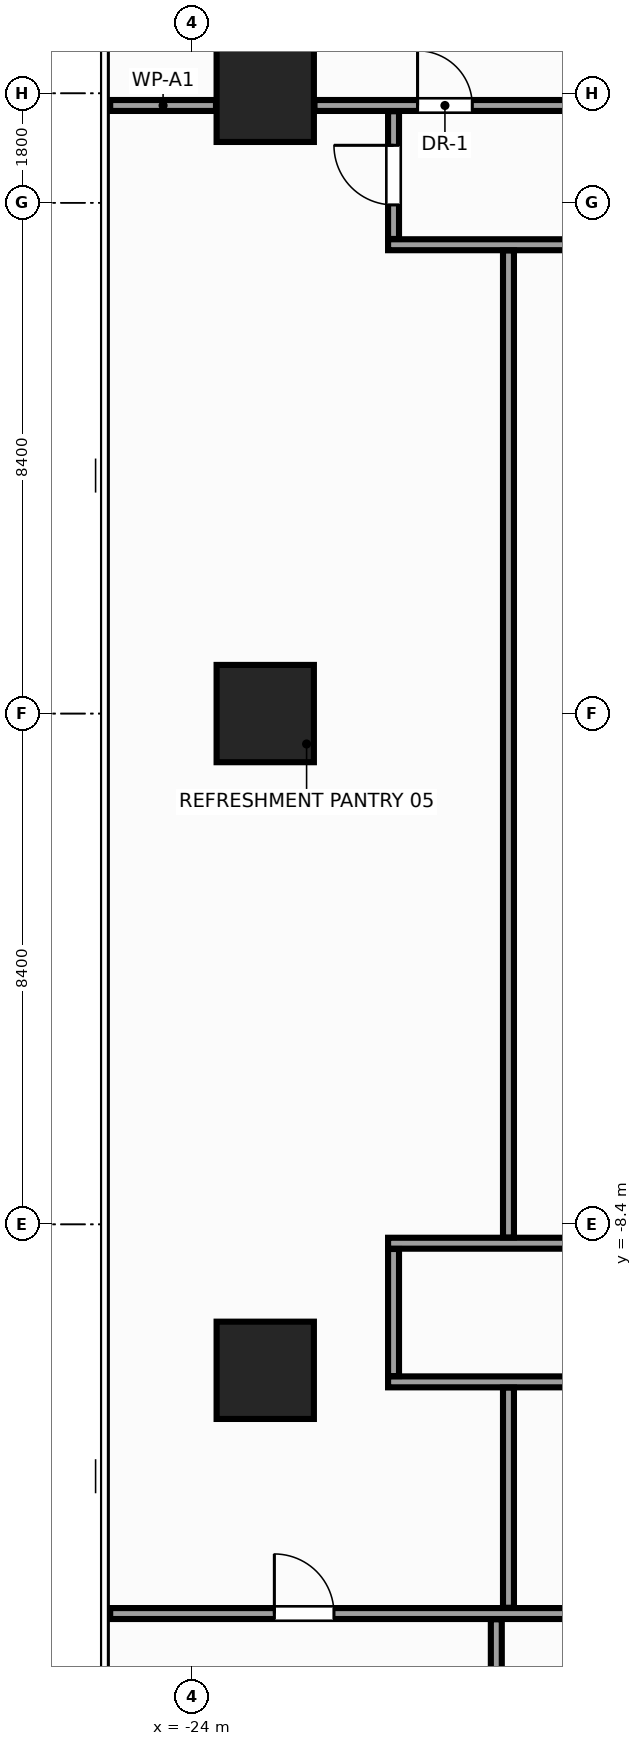
"""IFC4 building model, lengths in metres.
Left out: names, types, materials, properties, quantities, classifications, styles, units other than length and angle.
Written with IfcOpenShell. Run it as: python <this file> out.ifc"""

import sys

from ifc_helpers import new_model, si_unit, direction, frame, frame_2d, origin, origin_2d, place, context, subcontext, project, spatial, rectangle, extrude, source, transform, mapped, element, fill, save


model = new_model("IFC4")
c1 = context("Model", 3, precision=1e-05, world=origin(), true_north=direction((0.0, 1.0)))
c2 = subcontext(c1, "Body", "Model", "MODEL_VIEW")
j1 = project(units=[si_unit("LENGTHUNIT", "METRE"), si_unit("PLANEANGLEUNIT", "RADIAN")], contexts=[c1])
p1 = place(None, origin())
s1 = spatial("IfcSite", under=j1, at=p1, CompositionType="ELEMENT")
p2 = place(p1, origin())
s2 = spatial("IfcBuilding", under=s1, at=p2, CompositionType="ELEMENT")
p3 = place(p2, frame((0.0, 0.0, 117.2)))
s3 = spatial("IfcBuildingStorey", under=s2, at=p3, CompositionType="ELEMENT", Elevation=117.2)
m1 = source(origin(), c2, "Body", "SweptSolid", [
    extrude(rectangle(XDim=1.6, YDim=1.6, at=origin_2d()), origin(), (0.0, 0.0, 1.0), 3.6),
])
for number, where, z_axis, x_axis in (
    (1, (-22.8, -10.8, 0.0), (0.0, 0.0, 1.0), (1.0, 0.0, 0.0)),
    (2, (-22.8, 0.0, 0.0), (0.0, 0.0, 1.0), (1.0, 0.0, 0.0)),
    (3, (-22.8, 10.2, 0.0), (0.0, 0.0, 1.0), (1.0, 0.0, 0.0)),
):
    element("IfcColumn", number, at=place(p3, frame(where, z_axis=z_axis, x_axis=x_axis)), inside=s3, PredefinedType="COLUMN", context=c2, shape_type="MappedRepresentation", body=[
        mapped(m1, transform((0.0, 0.0, 0.0), x_axis=(1.0, 0.0, 0.0), y_axis=(0.0, 1.0, 0.0), z_axis=(0.0, 0.0, 1.0), scale=1.0)),
    ])
m2 = source(origin(), c2, "Body", "SweptSolid", [
    extrude(rectangle(XDim=1.74, YDim=0.18, at=frame_2d((0.87, 0.0))), origin(), (0.0, 0.0, 1.0), 3.36),
])
p4 = place(p3, frame((-25.35, 10.0, 0.0), z_axis=(0.0, 0.0, 1.0), x_axis=(1.0, 0.0, 0.0)))
e4 = element("IfcWall", 4, at=p4, inside=s3, PredefinedType="PARTITIONING", context=c2, shape_type="MappedRepresentation", body=[
    mapped(m2, transform((0.0, 0.0, 0.0), x_axis=(1.0, 0.0, 0.0), y_axis=(0.0, 1.0, 0.0), z_axis=(0.0, 0.0, 1.0), scale=1.0)),
])
m3 = source(origin(), c2, "Body", "SweptSolid", [
    extrude(rectangle(XDim=4.38, YDim=0.18, at=frame_2d((2.19, 0.0))), origin(), (0.0, 0.0, 1.0), 2.745),
])
p5 = place(p3, frame((-21.99, 10.0, 0.0), z_axis=(0.0, 0.0, 1.0), x_axis=(1.0, 0.0, 0.0)))
e5 = element("IfcWall", 5, at=p5, inside=s3, PredefinedType="PARTITIONING", context=c2, shape_type="MappedRepresentation", body=[
    mapped(m3, transform((0.0, 0.0, 0.0), x_axis=(1.0, 0.0, 0.0), y_axis=(0.0, 1.0, 0.0), z_axis=(0.0, 0.0, 1.0), scale=1.0)),
])
p6 = place(p5, frame((1.695, 0.0, 0.0)))
e6 = element("IfcOpeningElement", 6, at=p6, cuts=e5, PredefinedType="OPENING", context=c2, shape_type="SweptSolid", body=[
    extrude(rectangle(XDim=0.9, YDim=2.15, at=frame_2d((0.45, 1.075))), frame((0.0, 0.102, 0.0), z_axis=(0.0, -1.0, 0.0), x_axis=(1.0, 0.0, 0.0)), (0.0, 0.0, 1.0), 0.204),
])
m4 = source(origin(), c2, "Body", "SweptSolid", [
    extrude(rectangle(XDim=16.8, YDim=0.18, at=frame_2d((8.4, 0.0))), origin(), (0.0, 0.0, 1.0), 2.745),
])
p7 = place(p3, frame((-20.78, 7.71, 0.0), z_axis=(0.0, 0.0, 1.0), x_axis=(1.0, 0.0, 0.0)))
e7 = element("IfcWall", 7, at=p7, inside=s3, PredefinedType="PARTITIONING", context=c2, shape_type="MappedRepresentation", body=[
    mapped(m4, transform((0.0, 0.0, 0.0), x_axis=(1.0, 0.0, 0.0), y_axis=(0.0, 1.0, 0.0), z_axis=(0.0, 0.0, 1.0), scale=1.0)),
])
p8 = place(p7, frame((5.69, 0.0, 0.0)))
e8 = element("IfcOpeningElement", 8, at=p8, cuts=e7, PredefinedType="OPENING", context=c2, shape_type="SweptSolid", body=[
    extrude(rectangle(XDim=0.98, YDim=2.15, at=frame_2d((0.49, 1.075))), frame((0.0, 0.102, 0.0), z_axis=(0.0, -1.0, 0.0), x_axis=(1.0, 0.0, 0.0)), (0.0, 0.0, 1.0), 0.204),
])
p9 = place(p7, frame((13.085, 0.0, 0.0)))
e9 = element("IfcOpeningElement", 9, at=p9, cuts=e7, PredefinedType="OPENING", context=c2, shape_type="SweptSolid", body=[
    extrude(rectangle(XDim=0.98, YDim=2.15, at=frame_2d((0.49, 1.075))), frame((0.0, 0.102, 0.0), z_axis=(0.0, -1.0, 0.0), x_axis=(1.0, 0.0, 0.0)), (0.0, 0.0, 1.0), 0.204),
])
p10 = place(p3, frame((-20.78, -8.71, 0.0), z_axis=(0.0, 0.0, 1.0), x_axis=(1.0, 0.0, 0.0)))
e10 = element("IfcWall", 10, at=p10, inside=s3, PredefinedType="PARTITIONING", context=c2, shape_type="MappedRepresentation", body=[
    mapped(m4, transform((0.0, 0.0, 0.0), x_axis=(1.0, 0.0, 0.0), y_axis=(0.0, 1.0, 0.0), z_axis=(0.0, 0.0, 1.0), scale=1.0)),
])
m5 = source(origin(), c2, "Body", "SweptSolid", [
    extrude(rectangle(XDim=3.17, YDim=0.18, at=frame_2d((1.585, 0.0))), origin(), (0.0, 0.0, 1.0), 2.745),
])
p11 = place(p3, frame((-20.78, -10.99, 0.0), z_axis=(0.0, 0.0, 1.0), x_axis=(1.0, 0.0, 0.0)))
e11 = element("IfcWall", 11, at=p11, inside=s3, PredefinedType="PARTITIONING", context=c2, shape_type="MappedRepresentation", body=[
    mapped(m5, transform((0.0, 0.0, 0.0), x_axis=(1.0, 0.0, 0.0), y_axis=(0.0, 1.0, 0.0), z_axis=(0.0, 0.0, 1.0), scale=1.0)),
])
m6 = source(origin(), c2, "Body", "SweptSolid", [
    extrude(rectangle(XDim=2.1, YDim=0.18, at=frame_2d((1.05, 0.0))), origin(), (0.0, 0.0, 1.0), 3.36),
])
p12 = place(p3, frame((-20.69, 7.805, 0.0), z_axis=(0.0, 0.0, 1.0), x_axis=(0.0, 1.0, 0.0)))
e12 = element("IfcWall", 12, at=p12, inside=s3, PredefinedType="PARTITIONING", context=c2, shape_type="MappedRepresentation", body=[
    mapped(m6, transform((0.0, 0.0, 0.0), x_axis=(1.0, 0.0, 0.0), y_axis=(0.0, 1.0, 0.0), z_axis=(0.0, 0.0, 1.0), scale=1.0)),
])
p13 = place(p12, frame((0.56, 0.0, 0.0)))
e13 = element("IfcOpeningElement", 13, at=p13, cuts=e12, PredefinedType="OPENING", context=c2, shape_type="SweptSolid", body=[
    extrude(rectangle(XDim=0.98, YDim=2.15, at=frame_2d((0.49, 1.075))), frame((0.0, 0.102, 0.0), z_axis=(0.0, -1.0, 0.0), x_axis=(1.0, 0.0, 0.0)), (0.0, 0.0, 1.0), 0.204),
])
m7 = source(origin(), c2, "Body", "SweptSolid", [
    extrude(rectangle(XDim=2.09, YDim=0.18, at=frame_2d((1.045, 0.0))), origin(), (0.0, 0.0, 1.0), 3.36),
])
p14 = place(p3, frame((-20.69, -10.895, 0.0), z_axis=(0.0, 0.0, 1.0), x_axis=(0.0, 1.0, 0.0)))
e14 = element("IfcWall", 14, at=p14, inside=s3, PredefinedType="PARTITIONING", context=c2, shape_type="MappedRepresentation", body=[
    mapped(m7, transform((0.0, 0.0, 0.0), x_axis=(1.0, 0.0, 0.0), y_axis=(0.0, 1.0, 0.0), z_axis=(0.0, 0.0, 1.0), scale=1.0)),
])
m8 = source(origin(), c2, "Body", "SweptSolid", [
    extrude(rectangle(XDim=50.7, YDim=0.18, at=frame_2d((25.35, 0.0))), origin(), (0.0, 0.0, 1.0), 2.945),
])
p15 = place(p3, frame((-25.35, -14.8, 0.0), z_axis=(0.0, 0.0, 1.0), x_axis=(1.0, 0.0, 0.0)))
e15 = element("IfcWall", 15, at=p15, inside=s3, PredefinedType="PARTITIONING", context=c2, shape_type="MappedRepresentation", body=[
    mapped(m8, transform((0.0, 0.0, 0.0), x_axis=(1.0, 0.0, 0.0), y_axis=(0.0, 1.0, 0.0), z_axis=(0.0, 0.0, 1.0), scale=1.0)),
])
p16 = place(p15, frame((2.7, 0.0, 0.0)))
e16 = element("IfcOpeningElement", 16, at=p16, cuts=e15, PredefinedType="OPENING", context=c2, shape_type="SweptSolid", body=[
    extrude(rectangle(XDim=0.98, YDim=2.15, at=frame_2d((0.49, 1.075))), frame((0.0, 0.102, 0.0), z_axis=(0.0, -1.0, 0.0), x_axis=(1.0, 0.0, 0.0)), (0.0, 0.0, 1.0), 0.204),
])
p17 = place(p15, frame((46.42, 0.0, 0.0)))
e17 = element("IfcOpeningElement", 17, at=p17, cuts=e15, PredefinedType="OPENING", context=c2, shape_type="SweptSolid", body=[
    extrude(rectangle(XDim=0.98, YDim=2.15, at=frame_2d((0.49, 1.075))), frame((0.0, 0.102, 0.0), z_axis=(0.0, -1.0, 0.0), x_axis=(1.0, 0.0, 0.0)), (0.0, 0.0, 1.0), 0.204),
])
p18 = place(p15, frame((13.16, 0.0, 0.0)))
e18 = element("IfcOpeningElement", 18, at=p18, cuts=e15, PredefinedType="OPENING", context=c2, shape_type="SweptSolid", body=[
    extrude(rectangle(XDim=0.98, YDim=2.15, at=frame_2d((0.49, 1.075))), frame((0.0, 0.102, 0.0), z_axis=(0.0, -1.0, 0.0), x_axis=(1.0, 0.0, 0.0)), (0.0, 0.0, 1.0), 0.204),
])
p19 = place(p15, frame((22.16, 0.0, 0.0)))
e19 = element("IfcOpeningElement", 19, at=p19, cuts=e15, PredefinedType="OPENING", context=c2, shape_type="SweptSolid", body=[
    extrude(rectangle(XDim=0.98, YDim=2.15, at=frame_2d((0.49, 1.075))), frame((0.0, 0.102, 0.0), z_axis=(0.0, -1.0, 0.0), x_axis=(1.0, 0.0, 0.0)), (0.0, 0.0, 1.0), 0.204),
])
p20 = place(p15, frame((30.66, 0.0, 0.0)))
e20 = element("IfcOpeningElement", 20, at=p20, cuts=e15, PredefinedType="OPENING", context=c2, shape_type="SweptSolid", body=[
    extrude(rectangle(XDim=0.98, YDim=2.15, at=frame_2d((0.49, 1.075))), frame((0.0, 0.102, 0.0), z_axis=(0.0, -1.0, 0.0), x_axis=(1.0, 0.0, 0.0)), (0.0, 0.0, 1.0), 0.204),
])
p21 = place(p15, frame((8.96, 0.0, 0.0)))
e21 = element("IfcOpeningElement", 21, at=p21, cuts=e15, PredefinedType="OPENING", context=c2, shape_type="SweptSolid", body=[
    extrude(rectangle(XDim=0.98, YDim=2.15, at=frame_2d((0.49, 1.075))), frame((0.0, 0.102, 0.0), z_axis=(0.0, -1.0, 0.0), x_axis=(1.0, 0.0, 0.0)), (0.0, 0.0, 1.0), 0.204),
])
p22 = place(p15, frame((39.56, 0.0, 0.0)))
e22 = element("IfcOpeningElement", 22, at=p22, cuts=e15, PredefinedType="OPENING", context=c2, shape_type="SweptSolid", body=[
    extrude(rectangle(XDim=0.98, YDim=2.15, at=frame_2d((0.49, 1.075))), frame((0.0, 0.102, 0.0), z_axis=(0.0, -1.0, 0.0), x_axis=(1.0, 0.0, 0.0)), (0.0, 0.0, 1.0), 0.204),
])
m9 = source(origin(), c2, "Body", "SweptSolid", [
    extrude(rectangle(XDim=3.62, YDim=0.18, at=frame_2d((1.81, 0.0))), origin(), (0.0, 0.0, 1.0), 3.36),
])
p23 = place(p3, frame((-18.8, -14.705, 0.0), z_axis=(0.0, 0.0, 1.0), x_axis=(0.0, 1.0, 0.0)))
e23 = element("IfcWall", 23, at=p23, inside=s3, PredefinedType="PARTITIONING", context=c2, shape_type="MappedRepresentation", body=[
    mapped(m9, transform((0.0, 0.0, 0.0), x_axis=(1.0, 0.0, 0.0), y_axis=(0.0, 1.0, 0.0), z_axis=(0.0, 0.0, 1.0), scale=1.0)),
])
m10 = source(origin(), c2, "Body", "SweptSolid", [
    extrude(rectangle(XDim=16.23, YDim=0.18, at=frame_2d((8.115, 0.0))), origin(), (0.0, 0.0, 1.0), 2.745),
])
p24 = place(p3, frame((-18.8, -8.615, 0.0), z_axis=(0.0, 0.0, 1.0), x_axis=(0.0, 1.0, 0.0)))
e24 = element("IfcWall", 24, at=p24, inside=s3, PredefinedType="PARTITIONING", context=c2, shape_type="MappedRepresentation", body=[
    mapped(m10, transform((0.0, 0.0, 0.0), x_axis=(1.0, 0.0, 0.0), y_axis=(0.0, 1.0, 0.0), z_axis=(0.0, 0.0, 1.0), scale=1.0)),
])
m11 = source(origin(), c2, "Body", "SweptSolid", [
    extrude(rectangle(XDim=10.755, YDim=0.18, at=frame_2d((5.377, 0.0))), origin(), (0.0, 0.0, 1.0), 2.745),
])
p25 = place(p3, frame((-19.0, -25.65, 0.0), z_axis=(0.0, 0.0, 1.0), x_axis=(0.0, 1.0, 0.0)))
e25 = element("IfcWall", 25, at=p25, inside=s3, PredefinedType="PARTITIONING", context=c2, shape_type="MappedRepresentation", body=[
    mapped(m11, transform((0.0, 0.0, 0.0), x_axis=(1.0, 0.0, 0.0), y_axis=(0.0, 1.0, 0.0), z_axis=(0.0, 0.0, 1.0), scale=1.0)),
])
m12 = source(origin(), c2, "Body", "SweptSolid", [
    extrude(rectangle(XDim=0.9, YDim=2.15, at=frame_2d((0.45, 1.075))), frame((0.0, 0.025, 0.0), z_axis=(0.0, -1.0, 0.0), x_axis=(1.0, 0.0, 0.0)), (0.0, 0.0, 1.0), 0.05),
])
p26 = place(p6, origin())
e26 = element("IfcDoor", 26, at=p26, inside=s3, OperationType="SINGLE_SWING_LEFT", PredefinedType="DOOR", context=c2, shape_type="MappedRepresentation", body=[
    mapped(m12, transform((0.0, 0.0, 0.0), x_axis=(1.0, 0.0, 0.0), y_axis=(0.0, 1.0, 0.0), z_axis=(0.0, 0.0, 1.0), scale=1.0)),
])
fill(e6, e26)
m13 = source(origin(), c2, "Body", "SweptSolid", [
    extrude(rectangle(XDim=0.98, YDim=2.15, at=frame_2d((0.49, 1.075))), frame((0.0, 0.025, 0.0), z_axis=(0.0, -1.0, 0.0), x_axis=(1.0, 0.0, 0.0)), (0.0, 0.0, 1.0), 0.05),
])
p27 = place(p13, origin())
e27 = element("IfcDoor", 27, at=p27, inside=s3, OperationType="SINGLE_SWING_RIGHT", PredefinedType="DOOR", context=c2, shape_type="MappedRepresentation", body=[
    mapped(m13, transform((0.0, 0.0, 0.0), x_axis=(1.0, 0.0, 0.0), y_axis=(0.0, 1.0, 0.0), z_axis=(0.0, 0.0, 1.0), scale=1.0)),
])
fill(e13, e27)
p28 = place(p16, origin())
e28 = element("IfcDoor", 28, at=p28, inside=s3, OperationType="SINGLE_SWING_LEFT", PredefinedType="DOOR", context=c2, shape_type="MappedRepresentation", body=[
    mapped(m13, transform((0.0, 0.0, 0.0), x_axis=(1.0, 0.0, 0.0), y_axis=(0.0, 1.0, 0.0), z_axis=(0.0, 0.0, 1.0), scale=1.0)),
])
fill(e16, e28)
save(model, sys.argv[1])
